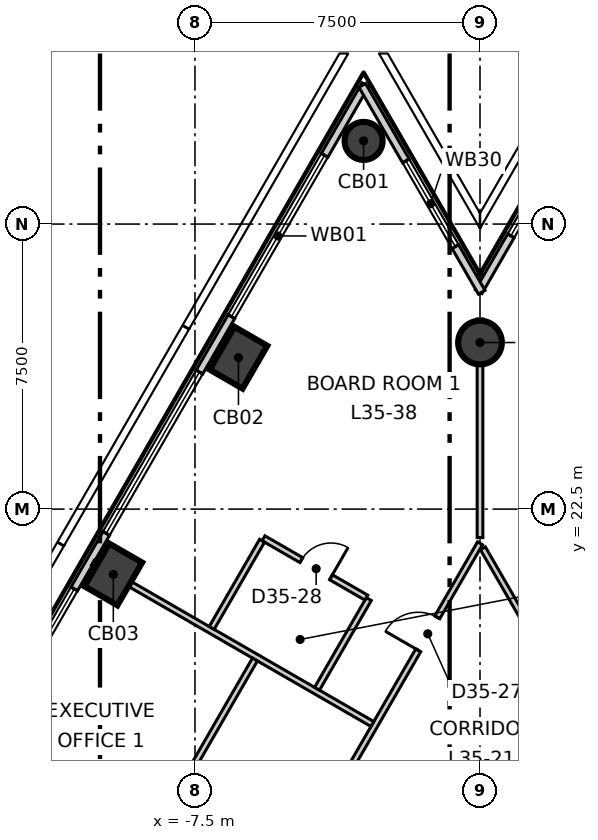
"""IFC4 building model, lengths in metres.
Left out: names, types, materials, properties, quantities, classifications, styles, units other than length and angle.
Written with IfcOpenShell. Run it as: python <this file> out.ifc"""

import sys

from ifc_helpers import new_model, si_unit, direction, frame, frame_2d, origin, origin_2d, place, context, subcontext, project, spatial, rectangle, circle, extrude, element, fill, save


model = new_model("IFC4")
c1 = context("Model", 3, precision=1e-05, world=origin(), true_north=direction((0.0, 1.0)))
c2 = subcontext(c1, "Body", "Model", "MODEL_VIEW")
j1 = project(units=[si_unit("LENGTHUNIT", "METRE"), si_unit("PLANEANGLEUNIT", "RADIAN")], contexts=[c1])
p1 = place(None, origin())
s1 = spatial("IfcSite", under=j1, at=p1, CompositionType="ELEMENT")
p2 = place(p1, origin())
s2 = spatial("IfcBuilding", under=s1, at=p2, CompositionType="ELEMENT")
p3 = place(p2, frame((0.0, 0.0, 152.3)))
s3 = spatial("IfcBuildingStorey", under=s2, at=p3, CompositionType="ELEMENT", Elevation=152.3)
p4 = place(p3, frame((-3.063, 32.188, -0.3), z_axis=(0.0, 0.0, 1.0), x_axis=(0.5, 0.866025403784, 0.0)))
e1 = element("IfcColumn", 1, at=p4, inside=s3, PredefinedType="COLUMN", context=c2, shape_type="SweptSolid", body=[
    extrude(circle(Radius=0.5, at=origin_2d()), origin(), (0.0, 0.0, 1.0), 4.0),
])
for number, where, z_axis, x_axis in (
    (2, (-6.356, 26.484, -0.3), (0.0, 0.0, 1.0), (0.5, 0.866, 0.0)),
    (3, (-9.649, 20.781, -0.3), (0.0, 0.0, 1.0), (0.5, 0.866, 0.0)),
):
    element("IfcColumn", number, at=place(p3, frame(where, z_axis=z_axis, x_axis=x_axis)), inside=s3, PredefinedType="COLUMN", context=c2, shape_type="SweptSolid", body=[
        extrude(rectangle(XDim=1.3, YDim=1.0, at=origin_2d()), origin(), (0.0, 0.0, 1.0), 4.0),
    ])
p5 = place(p3, frame((0.0, 26.883, -0.3), z_axis=(0.0, 0.0, 1.0), x_axis=(1.0, 0.0, 0.0)))
e4 = element("IfcColumn", 4, at=p5, inside=s3, PredefinedType="COLUMN", context=c2, shape_type="SweptSolid", body=[
    extrude(circle(Radius=0.575, at=origin_2d()), origin(), (0.0, 0.0, 1.0), 4.0),
])
p6 = place(p3, frame((-3.018, 33.666, 0.0), z_axis=(0.0, 0.0, 1.0), x_axis=(-0.499984613623, -0.866034286931, 0.0)))
e5 = element("IfcWall", 5, at=p6, inside=s3, PredefinedType="ELEMENTEDWALL", context=c2, shape_type="SweptSolid", body=[
    extrude(rectangle(XDim=55.274, YDim=0.2, at=frame_2d((27.637, 0.0))), origin(), (0.0, 0.0, 1.0), 3.7),
])
p7 = place(p6, frame((2.145, 0.0, 0.9)))
e6 = element("IfcOpeningElement", 6, at=p7, cuts=e5, PredefinedType="OPENING", context=c2, shape_type="SweptSolid", body=[
    extrude(rectangle(XDim=4.9, YDim=2.5, at=frame_2d((2.45, 1.25))), frame((0.0, 0.11, 0.0), z_axis=(0.0, -1.0, 0.0), x_axis=(1.0, 0.0, 0.0)), (0.0, 0.0, 1.0), 0.22),
])
p8 = place(p6, frame((8.731, 0.0, 0.9)))
e7 = element("IfcOpeningElement", 7, at=p8, cuts=e5, PredefinedType="OPENING", context=c2, shape_type="SweptSolid", body=[
    extrude(rectangle(XDim=4.9, YDim=2.5, at=frame_2d((2.45, 1.25))), frame((0.0, 0.11, 0.0), z_axis=(0.0, -1.0, 0.0), x_axis=(1.0, 0.0, 0.0)), (0.0, 0.0, 1.0), 0.22),
])
p9 = place(p6, frame((15.318, 0.0, 0.9)))
e8 = element("IfcOpeningElement", 8, at=p9, cuts=e5, PredefinedType="OPENING", context=c2, shape_type="SweptSolid", body=[
    extrude(rectangle(XDim=4.9, YDim=2.5, at=frame_2d((2.45, 1.25))), frame((0.0, 0.11, 0.0), z_axis=(0.0, -1.0, 0.0), x_axis=(1.0, 0.0, 0.0)), (0.0, 0.0, 1.0), 0.22),
])
p10 = place(p6, frame((21.904, 0.0, 0.9)))
e9 = element("IfcOpeningElement", 9, at=p10, cuts=e5, PredefinedType="OPENING", context=c2, shape_type="SweptSolid", body=[
    extrude(rectangle(XDim=4.9, YDim=2.5, at=frame_2d((2.45, 1.25))), frame((0.0, 0.11, 0.0), z_axis=(0.0, -1.0, 0.0), x_axis=(1.0, 0.0, 0.0)), (0.0, 0.0, 1.0), 0.22),
])
p11 = place(p6, frame((28.49, 0.0, 0.9)))
e10 = element("IfcOpeningElement", 10, at=p11, cuts=e5, PredefinedType="OPENING", context=c2, shape_type="SweptSolid", body=[
    extrude(rectangle(XDim=4.9, YDim=2.5, at=frame_2d((2.45, 1.25))), frame((0.0, 0.11, 0.0), z_axis=(0.0, -1.0, 0.0), x_axis=(1.0, 0.0, 0.0)), (0.0, 0.0, 1.0), 0.22),
])
p12 = place(p6, frame((35.076, 0.0, 0.9)))
e11 = element("IfcOpeningElement", 11, at=p12, cuts=e5, PredefinedType="OPENING", context=c2, shape_type="SweptSolid", body=[
    extrude(rectangle(XDim=4.9, YDim=2.5, at=frame_2d((2.45, 1.25))), frame((0.0, 0.11, 0.0), z_axis=(0.0, -1.0, 0.0), x_axis=(1.0, 0.0, 0.0)), (0.0, 0.0, 1.0), 0.22),
])
p13 = place(p6, frame((41.662, 0.0, 0.9)))
e12 = element("IfcOpeningElement", 12, at=p13, cuts=e5, PredefinedType="OPENING", context=c2, shape_type="SweptSolid", body=[
    extrude(rectangle(XDim=4.9, YDim=2.5, at=frame_2d((2.45, 1.25))), frame((0.0, 0.11, 0.0), z_axis=(0.0, -1.0, 0.0), x_axis=(1.0, 0.0, 0.0)), (0.0, 0.0, 1.0), 0.22),
])
p14 = place(p6, frame((48.248, 0.0, 0.9)))
e13 = element("IfcOpeningElement", 13, at=p14, cuts=e5, PredefinedType="OPENING", context=c2, shape_type="SweptSolid", body=[
    extrude(rectangle(XDim=4.9, YDim=2.5, at=frame_2d((2.45, 1.25))), frame((0.0, 0.11, 0.0), z_axis=(0.0, -1.0, 0.0), x_axis=(1.0, 0.0, 0.0)), (0.0, 0.0, 1.0), 0.22),
])
p15 = place(p3, frame((3.108, 33.666, 0.0), z_axis=(0.0, 0.0, 1.0), x_axis=(-0.499961152228, -0.866047831394, 0.0)))
e14 = element("IfcWall", 14, at=p15, inside=s3, PredefinedType="ELEMENTEDWALL", context=c2, shape_type="SweptSolid", body=[
    extrude(rectangle(XDim=6.286, YDim=0.2, at=frame_2d((3.143, 0.0))), origin(), (0.0, 0.0, 1.0), 3.7),
])
p16 = place(p15, frame((1.99, 0.0, 0.9)))
e15 = element("IfcOpeningElement", 15, at=p16, cuts=e14, PredefinedType="OPENING", context=c2, shape_type="SweptSolid", body=[
    extrude(rectangle(XDim=2.6, YDim=2.5, at=frame_2d((1.3, 1.25))), frame((0.0, 0.11, 0.0), z_axis=(0.0, -1.0, 0.0), x_axis=(1.0, 0.0, 0.0)), (0.0, 0.0, 1.0), 0.22),
])
p17 = place(p3, frame((0.045, 28.205, 0.0), z_axis=(0.0, 0.0, 1.0), x_axis=(-0.499977969162, 0.866038122921, 0.0)))
e16 = element("IfcWall", 16, at=p17, inside=s3, PredefinedType="ELEMENTEDWALL", context=c2, shape_type="SweptSolid", body=[
    extrude(rectangle(XDim=6.286, YDim=0.2, at=frame_2d((3.143, 0.0))), origin(), (0.0, 0.0, 1.0), 3.7),
])
p18 = place(p17, frame((1.39, 0.0, 0.9)))
e17 = element("IfcOpeningElement", 17, at=p18, cuts=e16, PredefinedType="OPENING", context=c2, shape_type="SweptSolid", body=[
    extrude(rectangle(XDim=2.6, YDim=2.5, at=frame_2d((1.3, 1.25))), frame((0.0, 0.11, 0.0), z_axis=(0.0, -1.0, 0.0), x_axis=(1.0, 0.0, 0.0)), (0.0, 0.0, 1.0), 0.22),
])
p19 = place(p3, frame((-8.902, 6.181, 0.0), z_axis=(0.0, 0.0, 1.0), x_axis=(0.499992688384, 0.866029625107, 0.0)))
e18 = element("IfcWall", 18, at=p19, inside=s3, PredefinedType="PARTITIONING", context=c2, shape_type="SweptSolid", body=[
    extrude(rectangle(XDim=17.804, YDim=0.15, at=frame_2d((8.902, 0.0))), origin(), (0.0, 0.0, 1.0), 3.7),
])
p20 = place(p19, frame((14.554, 0.0, 0.0)))
e19 = element("IfcOpeningElement", 19, at=p20, cuts=e18, PredefinedType="OPENING", context=c2, shape_type="SweptSolid", body=[
    extrude(rectangle(XDim=1.0, YDim=2.1, at=frame_2d((0.5, 1.05))), frame((0.0, 0.085, 0.0), z_axis=(0.0, -1.0, 0.0), x_axis=(1.0, 0.0, 0.0)), (0.0, 0.0, 1.0), 0.17),
])
p21 = place(p19, frame((5.62, 0.0, 0.0)))
e20 = element("IfcOpeningElement", 20, at=p21, cuts=e18, PredefinedType="OPENING", context=c2, shape_type="SweptSolid", body=[
    extrude(rectangle(XDim=1.1, YDim=2.1, at=frame_2d((0.55, 1.05))), frame((0.0, 0.085, 0.0), z_axis=(0.0, -1.0, 0.0), x_axis=(1.0, 0.0, 0.0)), (0.0, 0.0, 1.0), 0.17),
])
p22 = place(p3, frame((-10.186, 21.091, 0.0), z_axis=(0.0, 0.0, 1.0), x_axis=(0.866012267213, -0.500022752519, 0.0)))
e21 = element("IfcWall", 21, at=p22, inside=s3, PredefinedType="PARTITIONING", context=c2, shape_type="SweptSolid", body=[
    extrude(rectangle(XDim=8.492, YDim=0.15, at=frame_2d((4.246, 0.0))), origin(), (0.0, 0.0, 1.0), 3.7),
])
p23 = place(p3, frame((0.0, 21.75, 0.0), z_axis=(0.0, 0.0, 1.0), x_axis=(0.0, 1.0, 0.0)))
e22 = element("IfcWall", 22, at=p23, inside=s3, PredefinedType="PARTITIONING", context=c2, shape_type="SweptSolid", body=[
    extrude(rectangle(XDim=5.753, YDim=0.15, at=frame_2d((2.876, 0.0))), origin(), (0.0, 0.0, 1.0), 3.2),
])
p24 = place(p3, frame((0.076, 21.468, 0.0), z_axis=(0.0, 0.0, 1.0), x_axis=(0.500006592492, -0.866021597574, 0.0)))
e23 = element("IfcWall", 23, at=p24, inside=s3, PredefinedType="PARTITIONING", context=c2, shape_type="SweptSolid", body=[
    extrude(rectangle(XDim=17.652, YDim=0.15, at=frame_2d((8.826, 0.0))), origin(), (0.0, 0.0, 1.0), 3.7),
])
p25 = place(p24, frame((8.204, 0.0, 0.0)))
e24 = element("IfcOpeningElement", 24, at=p25, cuts=e23, PredefinedType="OPENING", context=c2, shape_type="SweptSolid", body=[
    extrude(rectangle(XDim=1.1, YDim=2.1, at=frame_2d((0.55, 1.05))), frame((0.0, 0.085, 0.0), z_axis=(0.0, -1.0, 0.0), x_axis=(1.0, 0.0, 0.0)), (0.0, 0.0, 1.0), 0.17),
])
p26 = place(p3, frame((-11.983, 8.045, 0.0), z_axis=(0.0, 0.0, 1.0), x_axis=(0.49998396455, 0.866034661658, 0.0)))
e25 = element("IfcWall", 25, at=p26, inside=s3, PredefinedType="PARTITIONING", context=c2, shape_type="SweptSolid", body=[
    extrude(rectangle(XDim=12.122, YDim=0.15, at=frame_2d((6.061, 0.0))), origin(), (0.0, 0.0, 1.0), 3.7),
])
p27 = place(p26, frame((5.547, 0.0, 0.0)))
e26 = element("IfcOpeningElement", 26, at=p27, cuts=e25, PredefinedType="OPENING", context=c2, shape_type="SweptSolid", body=[
    extrude(rectangle(XDim=1.0, YDim=2.1, at=frame_2d((0.5, 1.05))), frame((0.0, 0.085, 0.0), z_axis=(0.0, -1.0, 0.0), x_axis=(1.0, 0.0, 0.0)), (0.0, 0.0, 1.0), 0.17),
])
p28 = place(p3, frame((-4.288, 17.773, 0.0), z_axis=(0.0, 0.0, 1.0), x_axis=(0.500004325324, 0.866022906543, 0.0)))
e27 = element("IfcWall", 27, at=p28, inside=s3, PredefinedType="PARTITIONING", context=c2, shape_type="SweptSolid", body=[
    extrude(rectangle(XDim=2.724, YDim=0.15, at=frame_2d((1.362, 0.0))), origin(), (0.0, 0.0, 1.0), 3.7),
])
p29 = place(p3, frame((-5.697, 21.732, 0.0), z_axis=(0.0, 0.0, 1.0), x_axis=(0.866071089505, -0.499920861661, 0.0)))
e28 = element("IfcWall", 28, at=p29, inside=s3, PredefinedType="PARTITIONING", context=c2, shape_type="SweptSolid", body=[
    extrude(rectangle(XDim=3.125, YDim=0.15, at=frame_2d((1.562, 0.0))), origin(), (0.0, 0.0, 1.0), 3.7),
])
p30 = place(p29, frame((1.15, 0.0, 0.0)))
e29 = element("IfcOpeningElement", 29, at=p30, cuts=e28, PredefinedType="OPENING", context=c2, shape_type="SweptSolid", body=[
    extrude(rectangle(XDim=0.9, YDim=2.1, at=frame_2d((0.45, 1.05))), frame((0.0, 0.085, 0.0), z_axis=(0.0, -1.0, 0.0), x_axis=(1.0, 0.0, 0.0)), (0.0, 0.0, 1.0), 0.17),
])
p31 = place(p3, frame((-7.06, 19.373, 0.0), z_axis=(0.0, 0.0, 1.0), x_axis=(0.499993606316, 0.866029095148, 0.0)))
e30 = element("IfcWall", 30, at=p31, inside=s3, PredefinedType="PARTITIONING", context=c2, shape_type="SweptSolid", body=[
    extrude(rectangle(XDim=2.65, YDim=0.15, at=frame_2d((1.325, 0.0))), origin(), (0.0, 0.0, 1.0), 3.7),
])
p32 = place(p7, origin())
e31 = element("IfcWindow", 31, at=p32, inside=s3, PartitioningType="SINGLE_PANEL", PredefinedType="WINDOW", context=c2, shape_type="SweptSolid", body=[
    extrude(rectangle(XDim=4.9, YDim=2.5, at=frame_2d((2.45, 1.25))), frame((0.0, 0.03, 0.0), z_axis=(0.0, -1.0, 0.0), x_axis=(1.0, 0.0, 0.0)), (0.0, 0.0, 1.0), 0.06),
])
fill(e6, e31)
p33 = place(p8, origin())
e32 = element("IfcWindow", 32, at=p33, inside=s3, PartitioningType="SINGLE_PANEL", PredefinedType="WINDOW", context=c2, shape_type="SweptSolid", body=[
    extrude(rectangle(XDim=4.9, YDim=2.5, at=frame_2d((2.45, 1.25))), frame((0.0, 0.03, 0.0), z_axis=(0.0, -1.0, 0.0), x_axis=(1.0, 0.0, 0.0)), (0.0, 0.0, 1.0), 0.06),
])
fill(e7, e32)
p34 = place(p9, origin())
e33 = element("IfcWindow", 33, at=p34, inside=s3, PartitioningType="SINGLE_PANEL", PredefinedType="WINDOW", context=c2, shape_type="SweptSolid", body=[
    extrude(rectangle(XDim=4.9, YDim=2.5, at=frame_2d((2.45, 1.25))), frame((0.0, 0.03, 0.0), z_axis=(0.0, -1.0, 0.0), x_axis=(1.0, 0.0, 0.0)), (0.0, 0.0, 1.0), 0.06),
])
fill(e8, e33)
p35 = place(p16, origin())
e34 = element("IfcWindow", 34, at=p35, inside=s3, PartitioningType="SINGLE_PANEL", PredefinedType="WINDOW", context=c2, shape_type="SweptSolid", body=[
    extrude(rectangle(XDim=2.6, YDim=2.5, at=frame_2d((1.3, 1.25))), frame((0.0, 0.03, 0.0), z_axis=(0.0, -1.0, 0.0), x_axis=(1.0, 0.0, 0.0)), (0.0, 0.0, 1.0), 0.06),
])
fill(e15, e34)
p36 = place(p18, origin())
e35 = element("IfcWindow", 35, at=p36, inside=s3, PartitioningType="SINGLE_PANEL", PredefinedType="WINDOW", context=c2, shape_type="SweptSolid", body=[
    extrude(rectangle(XDim=2.6, YDim=2.5, at=frame_2d((1.3, 1.25))), frame((0.0, 0.03, 0.0), z_axis=(0.0, -1.0, 0.0), x_axis=(1.0, 0.0, 0.0)), (0.0, 0.0, 1.0), 0.06),
])
fill(e17, e35)
p37 = place(p20, origin())
e36 = element("IfcDoor", 36, at=p37, inside=s3, OperationType="SINGLE_SWING_RIGHT", PredefinedType="DOOR", context=c2, shape_type="SweptSolid", body=[
    extrude(rectangle(XDim=1.0, YDim=2.1, at=frame_2d((0.5, 1.05))), frame((0.0, 0.025, 0.0), z_axis=(0.0, -1.0, 0.0), x_axis=(1.0, 0.0, 0.0)), (0.0, 0.0, 1.0), 0.05),
])
fill(e19, e36)
p38 = place(p30, origin())
e37 = element("IfcDoor", 37, at=p38, inside=s3, OperationType="SINGLE_SWING_LEFT", PredefinedType="DOOR", context=c2, shape_type="SweptSolid", body=[
    extrude(rectangle(XDim=0.9, YDim=2.1, at=frame_2d((0.45, 1.05))), frame((0.0, 0.025, 0.0), z_axis=(0.0, -1.0, 0.0), x_axis=(1.0, 0.0, 0.0)), (0.0, 0.0, 1.0), 0.05),
])
fill(e29, e37)
save(model, sys.argv[1])
